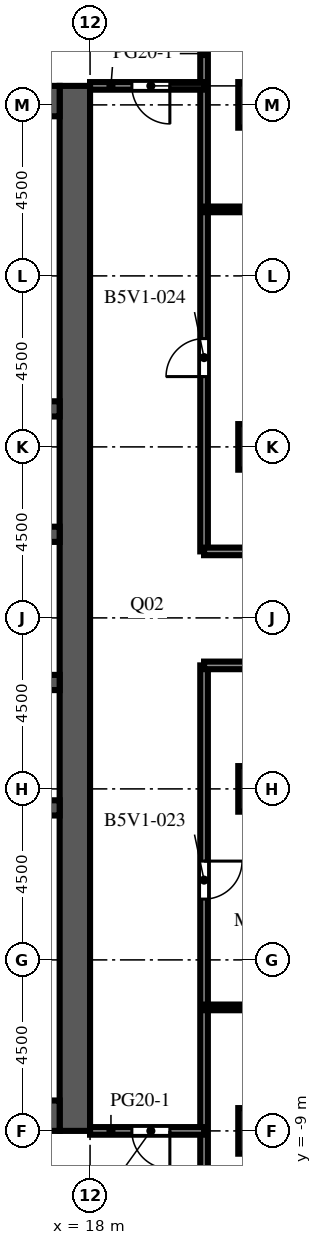
"""IFC4 building model, lengths in metres.
Left out: names, types, materials, properties, quantities, classifications, styles, units other than length and angle.
Written with IfcOpenShell. Run it as: python <this file> out.ifc"""

import sys

from ifc_helpers import new_model, si_unit, direction, frame, frame_2d, origin, origin_2d, place, context, subcontext, project, spatial, rectangle, extrude, element, fill, save


model = new_model("IFC4")
c1 = context("Model", 3, precision=1e-05, world=origin(), true_north=direction((0.0, 1.0)))
c2 = subcontext(c1, "Body", "Model", "MODEL_VIEW")
j1 = project(units=[si_unit("LENGTHUNIT", "METRE"), si_unit("PLANEANGLEUNIT", "RADIAN")], contexts=[c1])
p1 = place(None, origin())
s1 = spatial("IfcSite", under=j1, at=p1, CompositionType="ELEMENT")
p2 = place(p1, origin())
s2 = spatial("IfcBuilding", under=s1, at=p2, CompositionType="ELEMENT")
p3 = place(p2, frame((0.0, 0.0, 165.0)))
s3 = spatial("IfcBuildingStorey", under=s2, at=p3, CompositionType="ELEMENT", Elevation=165.0)
for number, where, z_axis, x_axis in (
    (1, (22.5, -9.0, 0.0), (0.0, 0.0, 1.0), (1.0, 0.0, 0.0)),
    (2, (22.5, 0.0, 0.0), (0.0, 0.0, 1.0), (1.0, 0.0, 0.0)),
    (3, (22.5, 9.0, 0.0), (0.0, 0.0, 1.0), (1.0, 0.0, 0.0)),
    (4, (22.5, 18.0, 0.0), (0.0, 0.0, 1.0), (1.0, 0.0, 0.0)),
):
    element("IfcColumn", number, at=place(p3, frame(where, z_axis=z_axis, x_axis=x_axis)), inside=s3, PredefinedType="COLUMN", context=c2, shape_type="SweptSolid", body=[
        extrude(rectangle(XDim=1.2, YDim=1.2, at=origin_2d()), origin(), (0.0, 0.0, 1.0), 4.1),
    ])
p4 = place(p3, frame((17.6, -9.0, 0.0), z_axis=(0.0, 0.0, 1.0), x_axis=(0.0, 1.0, 0.0)))
e5 = element("IfcWall", 5, at=p4, inside=s3, PredefinedType="SHEAR", context=c2, shape_type="SweptSolid", body=[
    extrude(rectangle(XDim=27.5, YDim=0.8, at=frame_2d((13.75, 0.0))), origin(), (0.0, 0.0, 1.0), 4.1),
])
p5 = place(p4, frame((12.55, 0.0, 0.0)))
e6 = element("IfcOpeningElement", 6, at=p5, cuts=e5, PredefinedType="OPENING", context=c2, shape_type="SweptSolid", body=[
    extrude(rectangle(XDim=2.4, YDim=2.4, at=frame_2d((1.2, 1.2))), frame((0.0, 0.41, 0.0), z_axis=(0.0, -1.0, 0.0), x_axis=(1.0, 0.0, 0.0)), (0.0, 0.0, 1.0), 0.82),
])
p6 = place(p4, frame((6.825, 0.0, 0.0)))
e7 = element("IfcOpeningElement", 7, at=p6, cuts=e5, PredefinedType="OPENING", context=c2, shape_type="SweptSolid", body=[
    extrude(rectangle(XDim=1.2, YDim=2.1, at=frame_2d((0.6, 1.05))), frame((0.0, 0.41, 0.0), z_axis=(0.0, -1.0, 0.0), x_axis=(1.0, 0.0, 0.0)), (0.0, 0.0, 1.0), 0.82),
])
p7 = place(p4, frame((19.475, 0.0, 0.0)))
e8 = element("IfcOpeningElement", 8, at=p7, cuts=e5, PredefinedType="OPENING", context=c2, shape_type="SweptSolid", body=[
    extrude(rectangle(XDim=1.2, YDim=2.1, at=frame_2d((0.6, 1.05))), frame((0.0, 0.41, 0.0), z_axis=(0.0, -1.0, 0.0), x_axis=(1.0, 0.0, 0.0)), (0.0, 0.0, 1.0), 0.82),
])
for number, where, z_axis, x_axis in (
    (9, (6.8, -8.6, 0.0), (0.0, 0.0, 1.0), (1.0, 0.0, 0.0)),
    (10, (6.8, 18.1, 0.0), (0.0, 0.0, 1.0), (1.0, 0.0, 0.0)),
):
    element("IfcWall", number, at=place(p3, frame(where, z_axis=z_axis, x_axis=x_axis)), inside=s3, PredefinedType="SHEAR", context=c2, shape_type="SweptSolid", body=[
        extrude(rectangle(XDim=10.4, YDim=0.8, at=frame_2d((5.2, 0.0))), origin(), (0.0, 0.0, 1.0), 4.1),
    ])
p8 = place(p3, frame((6.8, -0.5, 0.0), z_axis=(0.0, 0.0, 1.0), x_axis=(1.0, 0.0, 0.0)))
e11 = element("IfcWall", 11, at=p8, inside=s3, PredefinedType="SHEAR", context=c2, shape_type="SweptSolid", body=[
    extrude(rectangle(XDim=10.4, YDim=0.4, at=frame_2d((5.2, 0.0))), origin(), (0.0, 0.0, 1.0), 4.1),
])
p9 = place(p3, frame((6.8, 2.8, 0.0), z_axis=(0.0, 0.0, 1.0), x_axis=(1.0, 0.0, 0.0)))
e12 = element("IfcWall", 12, at=p9, inside=s3, PredefinedType="SHEAR", context=c2, shape_type="SweptSolid", body=[
    extrude(rectangle(XDim=10.4, YDim=0.4, at=frame_2d((5.2, 0.0))), origin(), (0.0, 0.0, 1.0), 4.1),
])
p10 = place(p9, frame((0.738, 0.0, 0.0)))
e13 = element("IfcOpeningElement", 13, at=p10, cuts=e12, PredefinedType="OPENING", context=c2, shape_type="SweptSolid", body=[
    extrude(rectangle(XDim=1.1, YDim=2.1, at=frame_2d((0.55, 1.05))), frame((0.0, 0.21, 0.0), z_axis=(0.0, -1.0, 0.0), x_axis=(1.0, 0.0, 0.0)), (0.0, 0.0, 1.0), 0.42),
])
p11 = place(p9, frame((3.337, 0.0, 0.0)))
e14 = element("IfcOpeningElement", 14, at=p11, cuts=e12, PredefinedType="OPENING", context=c2, shape_type="SweptSolid", body=[
    extrude(rectangle(XDim=1.1, YDim=2.1, at=frame_2d((0.55, 1.05))), frame((0.0, 0.21, 0.0), z_axis=(0.0, -1.0, 0.0), x_axis=(1.0, 0.0, 0.0)), (0.0, 0.0, 1.0), 0.42),
])
p12 = place(p9, frame((6.012, 0.0, 0.0)))
e15 = element("IfcOpeningElement", 15, at=p12, cuts=e12, PredefinedType="OPENING", context=c2, shape_type="SweptSolid", body=[
    extrude(rectangle(XDim=1.0, YDim=2.1, at=frame_2d((0.5, 1.05))), frame((0.0, 0.21, 0.0), z_axis=(0.0, -1.0, 0.0), x_axis=(1.0, 0.0, 0.0)), (0.0, 0.0, 1.0), 0.42),
])
p13 = place(p9, frame((8.613, 0.0, 0.0)))
e16 = element("IfcOpeningElement", 16, at=p13, cuts=e12, PredefinedType="OPENING", context=c2, shape_type="SweptSolid", body=[
    extrude(rectangle(XDim=1.0, YDim=2.1, at=frame_2d((0.5, 1.05))), frame((0.0, 0.21, 0.0), z_axis=(0.0, -1.0, 0.0), x_axis=(1.0, 0.0, 0.0)), (0.0, 0.0, 1.0), 0.42),
])
p14 = place(p3, frame((6.8, 6.7, 0.0), z_axis=(0.0, 0.0, 1.0), x_axis=(1.0, 0.0, 0.0)))
e17 = element("IfcWall", 17, at=p14, inside=s3, PredefinedType="SHEAR", context=c2, shape_type="SweptSolid", body=[
    extrude(rectangle(XDim=10.4, YDim=0.4, at=frame_2d((5.2, 0.0))), origin(), (0.0, 0.0, 1.0), 4.1),
])
p15 = place(p14, frame((3.337, 0.0, 0.0)))
e18 = element("IfcOpeningElement", 18, at=p15, cuts=e17, PredefinedType="OPENING", context=c2, shape_type="SweptSolid", body=[
    extrude(rectangle(XDim=1.1, YDim=2.1, at=frame_2d((0.55, 1.05))), frame((0.0, 0.21, 0.0), z_axis=(0.0, -1.0, 0.0), x_axis=(1.0, 0.0, 0.0)), (0.0, 0.0, 1.0), 0.42),
])
p16 = place(p14, frame((5.962, 0.0, 0.0)))
e19 = element("IfcOpeningElement", 19, at=p16, cuts=e17, PredefinedType="OPENING", context=c2, shape_type="SweptSolid", body=[
    extrude(rectangle(XDim=1.1, YDim=2.1, at=frame_2d((0.55, 1.05))), frame((0.0, 0.21, 0.0), z_axis=(0.0, -1.0, 0.0), x_axis=(1.0, 0.0, 0.0)), (0.0, 0.0, 1.0), 0.42),
])
p17 = place(p14, frame((8.663, 0.0, 0.0)))
e20 = element("IfcOpeningElement", 20, at=p17, cuts=e17, PredefinedType="OPENING", context=c2, shape_type="SweptSolid", body=[
    extrude(rectangle(XDim=1.1, YDim=2.1, at=frame_2d((0.55, 1.05))), frame((0.0, 0.21, 0.0), z_axis=(0.0, -1.0, 0.0), x_axis=(1.0, 0.0, 0.0)), (0.0, 0.0, 1.0), 0.42),
])
p18 = place(p14, frame((0.688, 0.0, 0.0)))
e21 = element("IfcOpeningElement", 21, at=p18, cuts=e17, PredefinedType="OPENING", context=c2, shape_type="SweptSolid", body=[
    extrude(rectangle(XDim=1.0, YDim=2.1, at=frame_2d((0.5, 1.05))), frame((0.0, 0.21, 0.0), z_axis=(0.0, -1.0, 0.0), x_axis=(1.0, 0.0, 0.0)), (0.0, 0.0, 1.0), 0.42),
])
p19 = place(p3, frame((6.8, 10.0, 0.0), z_axis=(0.0, 0.0, 1.0), x_axis=(1.0, 0.0, 0.0)))
e22 = element("IfcWall", 22, at=p19, inside=s3, PredefinedType="SHEAR", context=c2, shape_type="SweptSolid", body=[
    extrude(rectangle(XDim=10.4, YDim=0.4, at=frame_2d((5.2, 0.0))), origin(), (0.0, 0.0, 1.0), 4.1),
])
p20 = place(p3, frame((21.0, 3.25, 0.0), z_axis=(0.0, 0.0, 1.0), x_axis=(0.0, -1.0, 0.0)))
e23 = element("IfcWall", 23, at=p20, inside=s3, PredefinedType="PARTITIONING", context=c2, shape_type="SweptSolid", body=[
    extrude(rectangle(XDim=30.1, YDim=0.2, at=frame_2d((15.05, 0.0))), origin(), (0.0, 0.0, 1.0), 3.65),
])
p21 = place(p20, frame((5.15, 0.0, 0.0)))
e24 = element("IfcOpeningElement", 24, at=p21, cuts=e23, PredefinedType="OPENING", context=c2, shape_type="SweptSolid", body=[
    extrude(rectangle(XDim=1.0, YDim=2.1, at=frame_2d((0.5, 1.05))), frame((0.0, 0.11, 0.0), z_axis=(0.0, -1.0, 0.0), x_axis=(1.0, 0.0, 0.0)), (0.0, 0.0, 1.0), 0.22),
])
p22 = place(p3, frame((21.0, 26.85, 0.0), z_axis=(0.0, 0.0, 1.0), x_axis=(0.0, -1.0, 0.0)))
e25 = element("IfcWall", 25, at=p22, inside=s3, PredefinedType="PARTITIONING", context=c2, shape_type="SweptSolid", body=[
    extrude(rectangle(XDim=20.6, YDim=0.2, at=frame_2d((10.3, 0.0))), origin(), (0.0, 0.0, 1.0), 3.65),
])
p23 = place(p22, frame((15.0, 0.0, 0.0)))
e26 = element("IfcOpeningElement", 26, at=p23, cuts=e25, PredefinedType="OPENING", context=c2, shape_type="SweptSolid", body=[
    extrude(rectangle(XDim=1.0, YDim=2.1, at=frame_2d((0.5, 1.05))), frame((0.0, 0.11, 0.0), z_axis=(0.0, -1.0, 0.0), x_axis=(1.0, 0.0, 0.0)), (0.0, 0.0, 1.0), 0.22),
])
p24 = place(p3, frame((21.0, -9.0, 0.0), z_axis=(0.0, 0.0, 1.0), x_axis=(-1.0, 0.0, 0.0)))
e27 = element("IfcWall", 27, at=p24, inside=s3, PredefinedType="PARTITIONING", context=c2, shape_type="SweptSolid", body=[
    extrude(rectangle(XDim=3.0, YDim=0.2, at=frame_2d((1.5, 0.0))), origin(), (0.0, 0.0, 1.0), 3.65),
])
p25 = place(p24, frame((0.9, 0.0, 0.0)))
e28 = element("IfcOpeningElement", 28, at=p25, cuts=e27, PredefinedType="OPENING", context=c2, shape_type="SweptSolid", body=[
    extrude(rectangle(XDim=1.0, YDim=2.1, at=frame_2d((0.5, 1.05))), frame((0.0, 0.11, 0.0), z_axis=(0.0, -1.0, 0.0), x_axis=(1.0, 0.0, 0.0)), (0.0, 0.0, 1.0), 0.22),
])
p26 = place(p3, frame((26.85, -5.75, 0.0), z_axis=(0.0, 0.0, 1.0), x_axis=(-1.0, 0.0, 0.0)))
e29 = element("IfcWall", 29, at=p26, inside=s3, PredefinedType="PARTITIONING", context=c2, shape_type="SweptSolid", body=[
    extrude(rectangle(XDim=5.85, YDim=0.15, at=frame_2d((2.925, 0.0))), origin(), (0.0, 0.0, 1.0), 3.65),
])
p27 = place(p26, frame((2.25, 0.0, 0.0)))
e30 = element("IfcOpeningElement", 30, at=p27, cuts=e29, PredefinedType="OPENING", context=c2, shape_type="SweptSolid", body=[
    extrude(rectangle(XDim=1.0, YDim=2.1, at=frame_2d((0.5, 1.05))), frame((0.0, 0.085, 0.0), z_axis=(0.0, -1.0, 0.0), x_axis=(1.0, 0.0, 0.0)), (0.0, 0.0, 1.0), 0.17),
])
for number, where, z_axis, x_axis in (
    (31, (21.0, 3.25, 0.0), (0.0, 0.0, 1.0), (1.0, 0.0, 0.0)),
    (32, (21.0, 6.25, 0.0), (0.0, 0.0, 1.0), (1.0, 0.0, 0.0)),
):
    element("IfcWall", number, at=place(p3, frame(where, z_axis=z_axis, x_axis=x_axis)), inside=s3, PredefinedType="PARTITIONING", context=c2, shape_type="SweptSolid", body=[
        extrude(rectangle(XDim=5.85, YDim=0.2, at=frame_2d((2.925, 0.0))), origin(), (0.0, 0.0, 1.0), 3.65),
    ])
p28 = place(p3, frame((21.0, 15.25, 0.0), z_axis=(0.0, 0.0, 1.0), x_axis=(1.0, 0.0, 0.0)))
e33 = element("IfcWall", 33, at=p28, inside=s3, PredefinedType="PARTITIONING", context=c2, shape_type="SweptSolid", body=[
    extrude(rectangle(XDim=5.85, YDim=0.15, at=frame_2d((2.925, 0.0))), origin(), (0.0, 0.0, 1.0), 3.65),
])
p29 = place(p28, frame((3.1, 0.0, 0.0)))
e34 = element("IfcOpeningElement", 34, at=p29, cuts=e33, PredefinedType="OPENING", context=c2, shape_type="SweptSolid", body=[
    extrude(rectangle(XDim=1.0, YDim=2.1, at=frame_2d((0.5, 1.05))), frame((0.0, 0.085, 0.0), z_axis=(0.0, -1.0, 0.0), x_axis=(1.0, 0.0, 0.0)), (0.0, 0.0, 1.0), 0.17),
])
p30 = place(p3, frame((18.0, 18.5, 0.0), z_axis=(0.0, 0.0, 1.0), x_axis=(1.0, 0.0, 0.0)))
e35 = element("IfcWall", 35, at=p30, inside=s3, PredefinedType="PARTITIONING", context=c2, shape_type="SweptSolid", body=[
    extrude(rectangle(XDim=3.0, YDim=0.2, at=frame_2d((1.5, 0.0))), origin(), (0.0, 0.0, 1.0), 3.65),
])
p31 = place(p30, frame((1.1, 0.0, 0.0)))
e36 = element("IfcOpeningElement", 36, at=p31, cuts=e35, PredefinedType="OPENING", context=c2, shape_type="SweptSolid", body=[
    extrude(rectangle(XDim=1.0, YDim=2.1, at=frame_2d((0.5, 1.05))), frame((0.0, 0.11, 0.0), z_axis=(0.0, -1.0, 0.0), x_axis=(1.0, 0.0, 0.0)), (0.0, 0.0, 1.0), 0.22),
])
p32 = place(p5, origin())
e37 = element("IfcDoor", 37, at=p32, inside=s3, OperationType="DOUBLE_DOOR_DOUBLE_SWING", PredefinedType="DOOR", context=c2, shape_type="SweptSolid", body=[
    extrude(rectangle(XDim=2.4, YDim=2.4, at=frame_2d((1.2, 1.2))), frame((0.0, 0.025, 0.0), z_axis=(0.0, -1.0, 0.0), x_axis=(1.0, 0.0, 0.0)), (0.0, 0.0, 1.0), 0.05),
])
fill(e6, e37)
p33 = place(p6, frame((1.2, 0.0, 0.0), z_axis=(0.0, 0.0, 1.0), x_axis=(-1.0, 0.0, 0.0)))
e38 = element("IfcDoor", 38, at=p33, inside=s3, OperationType="SINGLE_SWING_LEFT", PredefinedType="DOOR", context=c2, shape_type="SweptSolid", body=[
    extrude(rectangle(XDim=1.2, YDim=2.1, at=frame_2d((0.6, 1.05))), frame((0.0, 0.025, 0.0), z_axis=(0.0, -1.0, 0.0), x_axis=(1.0, 0.0, 0.0)), (0.0, 0.0, 1.0), 0.05),
])
fill(e7, e38)
p34 = place(p7, frame((1.2, 0.0, 0.0), z_axis=(0.0, 0.0, 1.0), x_axis=(-1.0, 0.0, 0.0)))
e39 = element("IfcDoor", 39, at=p34, inside=s3, OperationType="SINGLE_SWING_LEFT", PredefinedType="DOOR", context=c2, shape_type="SweptSolid", body=[
    extrude(rectangle(XDim=1.2, YDim=2.1, at=frame_2d((0.6, 1.05))), frame((0.0, 0.025, 0.0), z_axis=(0.0, -1.0, 0.0), x_axis=(1.0, 0.0, 0.0)), (0.0, 0.0, 1.0), 0.05),
])
fill(e8, e39)
p35 = place(p25, origin())
e40 = element("IfcDoor", 40, at=p35, inside=s3, OperationType="SINGLE_SWING_LEFT", PredefinedType="DOOR", context=c2, shape_type="SweptSolid", body=[
    extrude(rectangle(XDim=1.0, YDim=2.1, at=frame_2d((0.5, 1.05))), frame((0.0, 0.025, 0.0), z_axis=(0.0, -1.0, 0.0), x_axis=(1.0, 0.0, 0.0)), (0.0, 0.0, 1.0), 0.05),
])
fill(e28, e40)
p36 = place(p31, origin())
e41 = element("IfcDoor", 41, at=p36, inside=s3, OperationType="SINGLE_SWING_RIGHT", PredefinedType="DOOR", context=c2, shape_type="SweptSolid", body=[
    extrude(rectangle(XDim=1.0, YDim=2.1, at=frame_2d((0.5, 1.05))), frame((0.0, 0.025, 0.0), z_axis=(0.0, -1.0, 0.0), x_axis=(1.0, 0.0, 0.0)), (0.0, 0.0, 1.0), 0.05),
])
fill(e36, e41)
p37 = place(p21, origin())
e42 = element("IfcDoor", 42, at=p37, inside=s3, OperationType="SINGLE_SWING_LEFT", PredefinedType="DOOR", context=c2, shape_type="SweptSolid", body=[
    extrude(rectangle(XDim=1.0, YDim=2.1, at=frame_2d((0.5, 1.05))), frame((0.0, 0.025, 0.0), z_axis=(0.0, -1.0, 0.0), x_axis=(1.0, 0.0, 0.0)), (0.0, 0.0, 1.0), 0.05),
])
fill(e24, e42)
p38 = place(p23, origin())
e43 = element("IfcDoor", 43, at=p38, inside=s3, OperationType="SINGLE_SWING_RIGHT", PredefinedType="DOOR", context=c2, shape_type="SweptSolid", body=[
    extrude(rectangle(XDim=1.0, YDim=2.1, at=frame_2d((0.5, 1.05))), frame((0.0, 0.025, 0.0), z_axis=(0.0, -1.0, 0.0), x_axis=(1.0, 0.0, 0.0)), (0.0, 0.0, 1.0), 0.05),
])
fill(e26, e43)
save(model, sys.argv[1])
